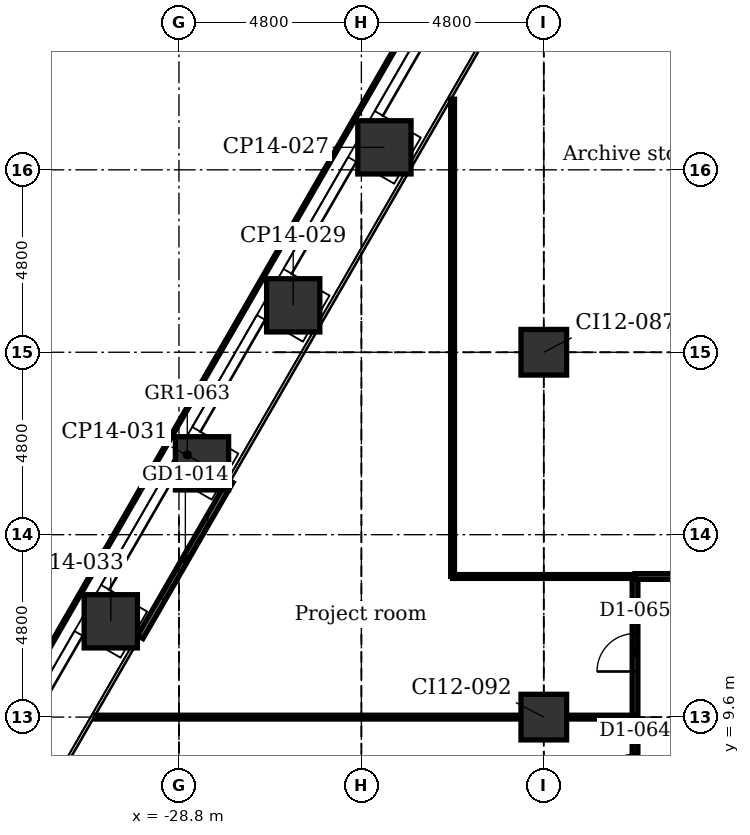
"""IFC4 building model, lengths in metres.
Left out: names, types, materials, properties, quantities, classifications, styles, units other than length and angle.
Written with IfcOpenShell. Run it as: python <this file> out.ifc"""

import sys

from ifc_helpers import new_model, si_unit, direction, frame, frame_2d, origin, origin_2d, place, context, subcontext, project, spatial, rectangle, extrude, element, fill, save


model = new_model("IFC4")
c1 = context("Model", 3, precision=1e-05, world=origin(), true_north=direction((0.0, 1.0)))
c2 = subcontext(c1, "Body", "Model", "MODEL_VIEW")
j1 = project(units=[si_unit("LENGTHUNIT", "METRE"), si_unit("PLANEANGLEUNIT", "RADIAN")], contexts=[c1])
p1 = place(None, origin())
s1 = spatial("IfcSite", under=j1, at=p1, CompositionType="ELEMENT")
p2 = place(p1, origin())
s2 = spatial("IfcBuilding", under=s1, at=p2, CompositionType="ELEMENT")
p3 = place(p2, frame((0.0, 0.0, 17.4)))
s3 = spatial("IfcBuildingStorey", under=s2, at=p3, CompositionType="ELEMENT", Elevation=17.4)
for number, where, z_axis, x_axis in (
    (1, (-32.994, 7.964, -0.25), (0.0, 0.0, 1.0), (0.5, 0.866, 0.0)),
    (2, (-30.594, 12.121, -0.25), (0.0, 0.0, 1.0), (0.5, 0.866, 0.0)),
    (3, (-28.194, 16.278, -0.25), (0.0, 0.0, 1.0), (0.5, 0.866, 0.0)),
    (4, (-25.794, 20.435, -0.25), (0.0, 0.0, 1.0), (0.5, 0.866, 0.0)),
    (5, (-23.394, 24.592, -0.25), (0.0, 0.0, 1.0), (0.5, 0.866, 0.0)),
):
    element("IfcColumn", number, at=place(p3, frame(where, z_axis=z_axis, x_axis=x_axis)), inside=s3, PredefinedType="COLUMN", context=c2, shape_type="SweptSolid", body=[
        extrude(rectangle(XDim=1.4, YDim=1.4, at=origin_2d()), origin(), (0.0, 0.0, 1.0), 5.0),
    ])
for number, where, z_axis, x_axis in (
    (6, (-19.2, 9.6, -0.25), (0.0, 0.0, 1.0), (1.0, 0.0, 0.0)),
    (7, (-19.2, 19.2, -0.25), (0.0, 0.0, 1.0), (1.0, 0.0, 0.0)),
):
    element("IfcColumn", number, at=place(p3, frame(where, z_axis=z_axis, x_axis=x_axis)), inside=s3, PredefinedType="COLUMN", context=c2, shape_type="SweptSolid", body=[
        extrude(rectangle(XDim=1.2, YDim=1.2, at=origin_2d()), origin(), (0.0, 0.0, 1.0), 5.0),
    ])
p4 = place(p3, frame((-29.817, 11.707, 0.0), z_axis=(0.0, 0.0, 1.0), x_axis=(0.499978080042, 0.866038058908, 0.0)))
e8 = element("IfcWall", 8, at=p4, inside=s3, PredefinedType="PARTITIONING", context=c2, shape_type="SweptSolid", body=[
    extrude(rectangle(XDim=4.74, YDim=0.16, at=frame_2d((2.37, 0.0))), origin(), (0.0, 0.0, 1.0), 4.75),
])
p5 = place(p4, frame((1.17, 0.0, 0.0)))
e9 = element("IfcOpeningElement", 9, at=p5, cuts=e8, PredefinedType="OPENING", context=c2, shape_type="SweptSolid", body=[
    extrude(rectangle(XDim=2.4, YDim=2.4, at=frame_2d((1.2, 1.2))), frame((0.0, 0.09, 0.0), z_axis=(0.0, -1.0, 0.0), x_axis=(1.0, 0.0, 0.0)), (0.0, 0.0, 1.0), 0.18),
])
p6 = place(p3, frame((-16.8, 3.95, 0.0), z_axis=(0.0, 0.0, 1.0), x_axis=(0.0, 1.0, 0.0)))
e10 = element("IfcWall", 10, at=p6, inside=s3, PredefinedType="PARTITIONING", context=c2, shape_type="SweptSolid", body=[
    extrude(rectangle(XDim=9.35, YDim=0.15, at=frame_2d((4.675, 0.0))), origin(), (0.0, 0.0, 1.0), 4.75),
])
p7 = place(p6, frame((0.95, 0.0, 0.0)))
e11 = element("IfcOpeningElement", 11, at=p7, cuts=e10, PredefinedType="OPENING", context=c2, shape_type="SweptSolid", body=[
    extrude(rectangle(XDim=1.0, YDim=2.1, at=frame_2d((0.5, 1.05))), frame((0.0, 0.085, 0.0), z_axis=(0.0, -1.0, 0.0), x_axis=(1.0, 0.0, 0.0)), (0.0, 0.0, 1.0), 0.17),
])
p8 = place(p6, frame((3.675, 0.0, 0.0)))
e12 = element("IfcOpeningElement", 12, at=p8, cuts=e10, PredefinedType="OPENING", context=c2, shape_type="SweptSolid", body=[
    extrude(rectangle(XDim=1.0, YDim=2.1, at=frame_2d((0.5, 1.05))), frame((0.0, 0.085, 0.0), z_axis=(0.0, -1.0, 0.0), x_axis=(1.0, 0.0, 0.0)), (0.0, 0.0, 1.0), 0.17),
])
p9 = place(p6, frame((6.85, 0.0, 0.0)))
e13 = element("IfcOpeningElement", 13, at=p9, cuts=e10, PredefinedType="OPENING", context=c2, shape_type="SweptSolid", body=[
    extrude(rectangle(XDim=1.0, YDim=2.1, at=frame_2d((0.5, 1.05))), frame((0.0, 0.085, 0.0), z_axis=(0.0, -1.0, 0.0), x_axis=(1.0, 0.0, 0.0)), (0.0, 0.0, 1.0), 0.17),
])
p10 = place(p3, frame((-21.6, 13.3, 0.0), z_axis=(0.0, 0.0, 1.0), x_axis=(0.0, 1.0, 0.0)))
e14 = element("IfcWall", 14, at=p10, inside=s3, PredefinedType="PARTITIONING", context=c2, shape_type="SweptSolid", body=[
    extrude(rectangle(XDim=12.558, YDim=0.1, at=frame_2d((6.279, 0.0))), origin(), (0.0, 0.0, 1.0), 4.75),
])
p11 = place(p3, frame((-30.987, 9.6, 0.0), z_axis=(0.0, 0.0, 1.0), x_axis=(1.0, 0.0, 0.0)))
e15 = element("IfcWall", 15, at=p11, inside=s3, PredefinedType="PARTITIONING", context=c2, shape_type="SweptSolid", body=[
    extrude(rectangle(XDim=11.187, YDim=0.1, at=frame_2d((5.593, 0.0))), origin(), (0.0, 0.0, 1.0), 3.988),
])
p12 = place(p3, frame((-18.6, 9.6, 0.0), z_axis=(0.0, 0.0, 1.0), x_axis=(1.0, 0.0, 0.0)))
e16 = element("IfcWall", 16, at=p12, inside=s3, PredefinedType="PARTITIONING", context=c2, shape_type="SweptSolid", body=[
    extrude(rectangle(XDim=1.8, YDim=0.1, at=frame_2d((0.9, 0.0))), origin(), (0.0, 0.0, 1.0), 4.142),
])
p13 = place(p3, frame((-21.6, 13.3, 0.0), z_axis=(0.0, 0.0, 1.0), x_axis=(1.0, 0.0, 0.0)))
e17 = element("IfcWall", 17, at=p13, inside=s3, PredefinedType="PARTITIONING", context=c2, shape_type="SweptSolid", body=[
    extrude(rectangle(XDim=4.8, YDim=0.1, at=frame_2d((2.4, 0.0))), origin(), (0.0, 0.0, 1.0), 4.75),
])
p14 = place(p3, frame((-16.8, 13.3, 0.0), z_axis=(0.0, 0.0, 1.0), x_axis=(1.0, 0.0, 0.0)))
e18 = element("IfcWall", 18, at=p14, inside=s3, PredefinedType="PARTITIONING", context=c2, shape_type="SweptSolid", body=[
    extrude(rectangle(XDim=33.6, YDim=0.15, at=frame_2d((16.8, 0.0))), origin(), (0.0, 0.0, 1.0), 4.75),
])
p15 = place(p14, frame((1.9, 0.0, 0.0)))
e19 = element("IfcOpeningElement", 19, at=p15, cuts=e18, PredefinedType="OPENING", context=c2, shape_type="SweptSolid", body=[
    extrude(rectangle(XDim=1.0, YDim=2.1, at=frame_2d((0.5, 1.05))), frame((0.0, 0.085, 0.0), z_axis=(0.0, -1.0, 0.0), x_axis=(1.0, 0.0, 0.0)), (0.0, 0.0, 1.0), 0.17),
])
p16 = place(p14, frame((5.375, 0.0, 0.0)))
e20 = element("IfcOpeningElement", 20, at=p16, cuts=e18, PredefinedType="OPENING", context=c2, shape_type="SweptSolid", body=[
    extrude(rectangle(XDim=1.0, YDim=2.1, at=frame_2d((0.5, 1.05))), frame((0.0, 0.085, 0.0), z_axis=(0.0, -1.0, 0.0), x_axis=(1.0, 0.0, 0.0)), (0.0, 0.0, 1.0), 0.17),
])
p17 = place(p14, frame((9.825, 0.0, 0.0)))
e21 = element("IfcOpeningElement", 21, at=p17, cuts=e18, PredefinedType="OPENING", context=c2, shape_type="SweptSolid", body=[
    extrude(rectangle(XDim=1.0, YDim=2.1, at=frame_2d((0.5, 1.05))), frame((0.0, 0.085, 0.0), z_axis=(0.0, -1.0, 0.0), x_axis=(1.0, 0.0, 0.0)), (0.0, 0.0, 1.0), 0.17),
])
p18 = place(p14, frame((14.335, 0.0, 0.0)))
e22 = element("IfcOpeningElement", 22, at=p18, cuts=e18, PredefinedType="OPENING", context=c2, shape_type="SweptSolid", body=[
    extrude(rectangle(XDim=1.0, YDim=2.1, at=frame_2d((0.5, 1.05))), frame((0.0, 0.085, 0.0), z_axis=(0.0, -1.0, 0.0), x_axis=(1.0, 0.0, 0.0)), (0.0, 0.0, 1.0), 0.17),
])
p19 = place(p14, frame((18.185, 0.0, 0.0)))
e23 = element("IfcOpeningElement", 23, at=p19, cuts=e18, PredefinedType="OPENING", context=c2, shape_type="SweptSolid", body=[
    extrude(rectangle(XDim=1.0, YDim=2.1, at=frame_2d((0.5, 1.05))), frame((0.0, 0.085, 0.0), z_axis=(0.0, -1.0, 0.0), x_axis=(1.0, 0.0, 0.0)), (0.0, 0.0, 1.0), 0.17),
])
p20 = place(p14, frame((27.575, 0.0, 0.0)))
e24 = element("IfcOpeningElement", 24, at=p20, cuts=e18, PredefinedType="OPENING", context=c2, shape_type="SweptSolid", body=[
    extrude(rectangle(XDim=1.0, YDim=2.1, at=frame_2d((0.5, 1.05))), frame((0.0, 0.085, 0.0), z_axis=(0.0, -1.0, 0.0), x_axis=(1.0, 0.0, 0.0)), (0.0, 0.0, 1.0), 0.17),
])
p21 = place(p14, frame((31.825, 0.0, 0.0)))
e25 = element("IfcOpeningElement", 25, at=p21, cuts=e18, PredefinedType="OPENING", context=c2, shape_type="SweptSolid", body=[
    extrude(rectangle(XDim=1.0, YDim=2.1, at=frame_2d((0.5, 1.05))), frame((0.0, 0.085, 0.0), z_axis=(0.0, -1.0, 0.0), x_axis=(1.0, 0.0, 0.0)), (0.0, 0.0, 1.0), 0.17),
])
p22 = place(p14, frame((23.55, 0.0, 0.0)))
e26 = element("IfcOpeningElement", 26, at=p22, cuts=e18, PredefinedType="OPENING", context=c2, shape_type="SweptSolid", body=[
    extrude(rectangle(XDim=0.9, YDim=2.1, at=frame_2d((0.45, 1.05))), frame((0.0, 0.085, 0.0), z_axis=(0.0, -1.0, 0.0), x_axis=(1.0, 0.0, 0.0)), (0.0, 0.0, 1.0), 0.17),
])
p23 = place(p14, frame((20.55, 0.0, 0.0)))
e27 = element("IfcOpeningElement", 27, at=p23, cuts=e18, PredefinedType="OPENING", context=c2, shape_type="SweptSolid", body=[
    extrude(rectangle(XDim=0.9, YDim=2.1, at=frame_2d((0.45, 1.05))), frame((0.0, 0.085, 0.0), z_axis=(0.0, -1.0, 0.0), x_axis=(1.0, 0.0, 0.0)), (0.0, 0.0, 1.0), 0.17),
])
p24 = place(p5, origin())
e28 = element("IfcDoor", 28, at=p24, inside=s3, OperationType="DOUBLE_DOOR_SLIDING", PredefinedType="DOOR", context=c2, shape_type="SweptSolid", body=[
    extrude(rectangle(XDim=2.4, YDim=2.4, at=frame_2d((1.2, 1.2))), frame((0.0, 0.025, 0.0), z_axis=(0.0, -1.0, 0.0), x_axis=(1.0, 0.0, 0.0)), (0.0, 0.0, 1.0), 0.05),
])
fill(e9, e28)
p25 = place(p8, origin())
e29 = element("IfcDoor", 29, at=p25, inside=s3, OperationType="SINGLE_SWING_LEFT", PredefinedType="DOOR", context=c2, shape_type="SweptSolid", body=[
    extrude(rectangle(XDim=1.0, YDim=2.1, at=frame_2d((0.5, 1.05))), frame((0.0, 0.025, 0.0), z_axis=(0.0, -1.0, 0.0), x_axis=(1.0, 0.0, 0.0)), (0.0, 0.0, 1.0), 0.05),
])
fill(e12, e29)
p26 = place(p9, origin())
e30 = element("IfcDoor", 30, at=p26, inside=s3, OperationType="SINGLE_SWING_LEFT", PredefinedType="DOOR", context=c2, shape_type="SweptSolid", body=[
    extrude(rectangle(XDim=1.0, YDim=2.1, at=frame_2d((0.5, 1.05))), frame((0.0, 0.025, 0.0), z_axis=(0.0, -1.0, 0.0), x_axis=(1.0, 0.0, 0.0)), (0.0, 0.0, 1.0), 0.05),
])
fill(e13, e30)
save(model, sys.argv[1])
